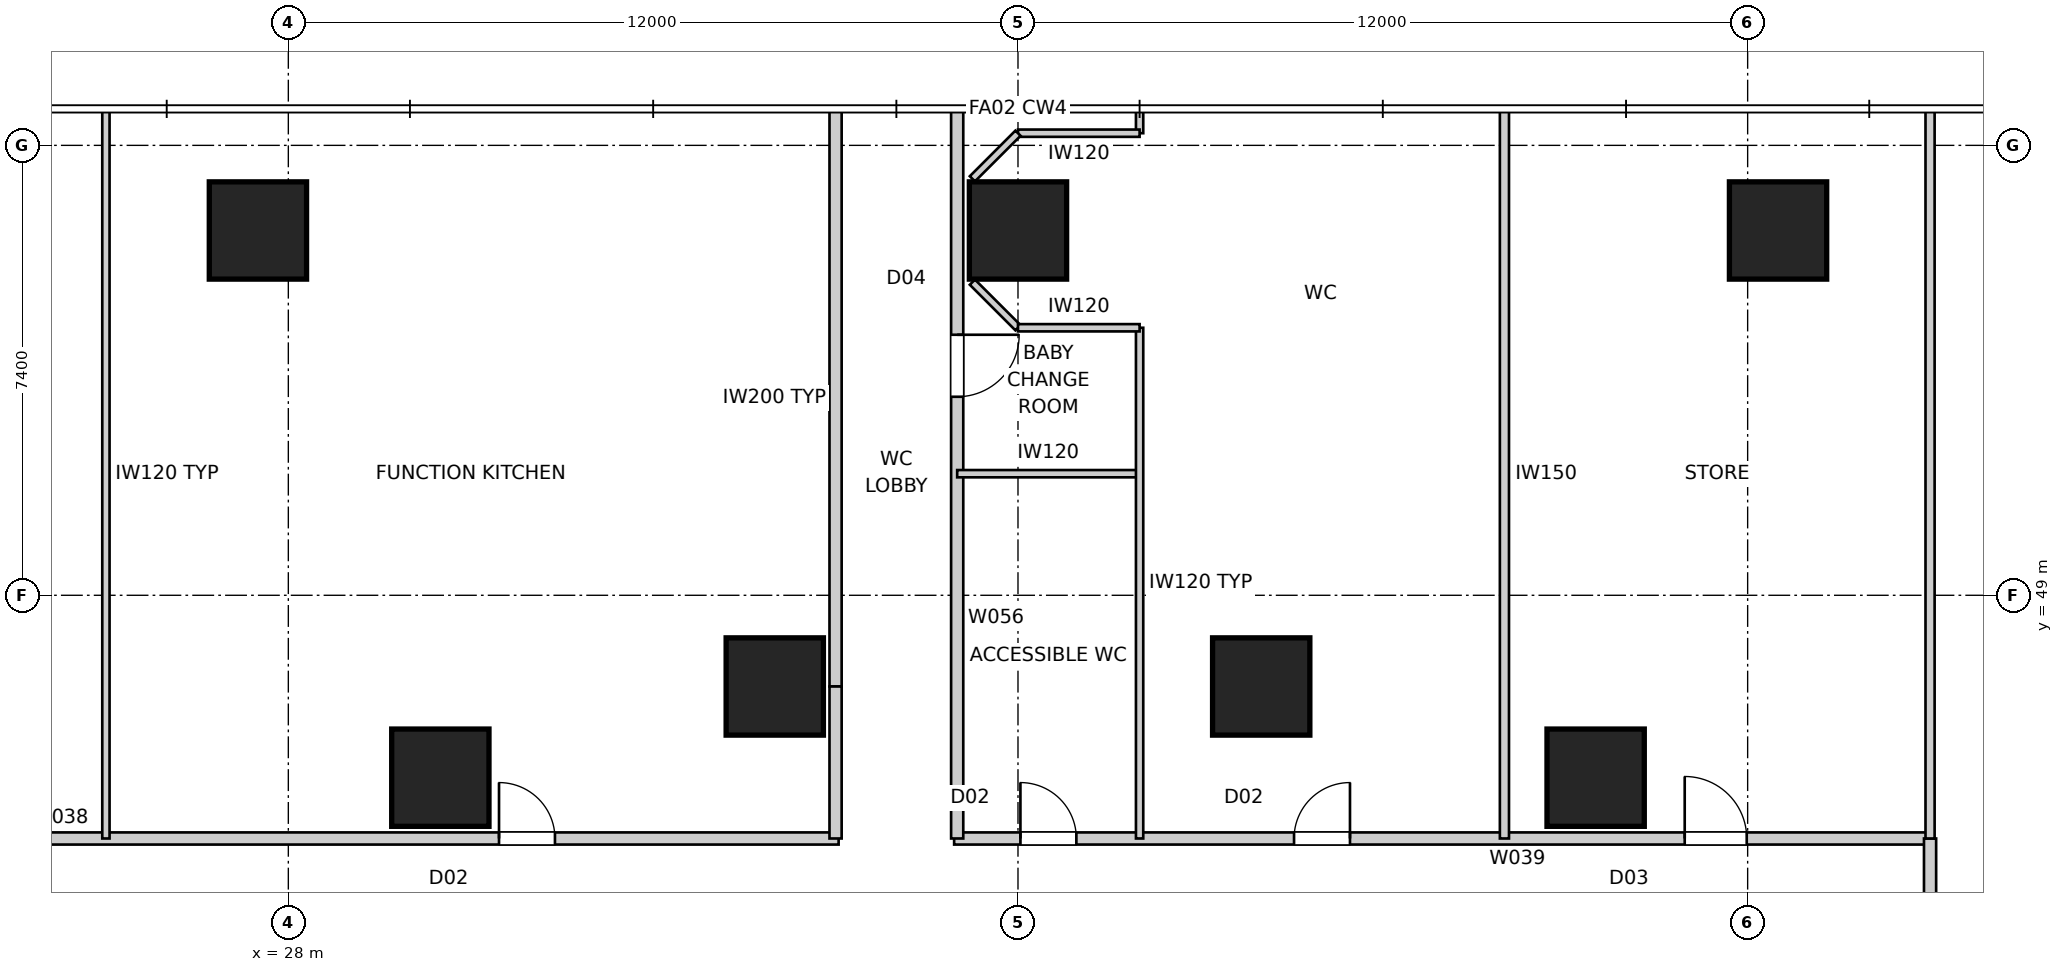
"""IFC4 building model, lengths in metres.
Left out: names, types, materials, properties, quantities, classifications, styles, units other than length and angle.
Written with IfcOpenShell. Run it as: python <this file> out.ifc"""

import sys

from ifc_helpers import new_model, si_unit, direction, frame, frame_2d, origin, origin_2d, place, context, subcontext, project, spatial, rectangle, extrude, element, fill, save


model = new_model("IFC4")
c1 = context("Model", 3, precision=1e-05, world=origin(), true_north=direction((0.0, 1.0)))
c2 = subcontext(c1, "Body", "Model", "MODEL_VIEW")
j1 = project(units=[si_unit("LENGTHUNIT", "METRE"), si_unit("PLANEANGLEUNIT", "RADIAN")], contexts=[c1])
p1 = place(None, origin())
s1 = spatial("IfcSite", under=j1, at=p1, CompositionType="ELEMENT")
p2 = place(p1, origin())
s2 = spatial("IfcBuilding", under=s1, at=p2, CompositionType="ELEMENT")
p3 = place(p2, frame((0.0, 0.0, 10.5)))
s3 = spatial("IfcBuildingStorey", under=s2, at=p3, CompositionType="ELEMENT", Elevation=10.5)
for number, where, z_axis, x_axis in (
    (1, (52.5, 55.0, 0.0), (0.0, 0.0, 1.0), (1.0, 0.0, 0.0)),
    (2, (40.0, 55.0, 0.0), (0.0, 0.0, 1.0), (1.0, 0.0, 0.0)),
    (3, (27.5, 55.0, 0.0), (0.0, 0.0, 1.0), (1.0, 0.0, 0.0)),
    (4, (49.5, 46.0, 0.0), (0.0, 0.0, 1.0), (1.0, 0.0, 0.0)),
    (5, (44.0, 47.5, 0.0), (0.0, 0.0, 1.0), (1.0, 0.0, 0.0)),
    (6, (36.0, 47.5, 0.0), (0.0, 0.0, 1.0), (1.0, 0.0, 0.0)),
    (7, (30.5, 46.0, 0.0), (0.0, 0.0, 1.0), (1.0, 0.0, 0.0)),
):
    element("IfcColumn", number, at=place(p3, frame(where, z_axis=z_axis, x_axis=x_axis)), inside=s3, PredefinedType="COLUMN", context=c2, shape_type="SweptSolid", body=[
        extrude(rectangle(XDim=1.6, YDim=1.6, at=origin_2d()), origin(), (0.0, 0.0, 1.0), 4.5),
    ])
p4 = place(p3, frame((8.4, 45.0, 0.0), z_axis=(0.0, 0.0, 1.0), x_axis=(1.0, 0.0, 0.0)))
e8 = element("IfcWall", 8, at=p4, inside=s3, PredefinedType="PARTITIONING", context=c2, shape_type="SweptSolid", body=[
    extrude(rectangle(XDim=28.65, YDim=0.2, at=frame_2d((14.325, 0.0))), origin(), (0.0, 0.0, 1.0), 4.35),
])
p5 = place(p4, frame((23.065, 0.0, 0.0)))
e9 = element("IfcOpeningElement", 9, at=p5, cuts=e8, PredefinedType="OPENING", context=c2, shape_type="SweptSolid", body=[
    extrude(rectangle(XDim=0.92, YDim=2.34, at=frame_2d((0.46, 1.17))), frame((0.0, 0.11, 0.0), z_axis=(0.0, -1.0, 0.0), x_axis=(1.0, 0.0, 0.0)), (0.0, 0.0, 1.0), 0.22),
])
p6 = place(p4, frame((7.715, 0.0, 0.0)))
e10 = element("IfcOpeningElement", 10, at=p6, cuts=e8, PredefinedType="OPENING", context=c2, shape_type="SweptSolid", body=[
    extrude(rectangle(XDim=0.92, YDim=2.34, at=frame_2d((0.46, 1.17))), frame((0.0, 0.11, 0.0), z_axis=(0.0, -1.0, 0.0), x_axis=(1.0, 0.0, 0.0)), (0.0, 0.0, 1.0), 0.22),
])
p7 = place(p3, frame((38.95, 45.0, 0.0), z_axis=(0.0, 0.0, 1.0), x_axis=(1.0, 0.0, 0.0)))
e11 = element("IfcWall", 11, at=p7, inside=s3, PredefinedType="PARTITIONING", context=c2, shape_type="SweptSolid", body=[
    extrude(rectangle(XDim=16.05, YDim=0.2, at=frame_2d((8.025, 0.0))), origin(), (0.0, 0.0, 1.0), 4.35),
])
p8 = place(p7, frame((12.015, 0.0, 0.0)))
e12 = element("IfcOpeningElement", 12, at=p8, cuts=e11, PredefinedType="OPENING", context=c2, shape_type="SweptSolid", body=[
    extrude(rectangle(XDim=1.02, YDim=2.1, at=frame_2d((0.51, 1.05))), frame((0.0, 0.11, 0.0), z_axis=(0.0, -1.0, 0.0), x_axis=(1.0, 0.0, 0.0)), (0.0, 0.0, 1.0), 0.22),
])
p9 = place(p7, frame((5.59, 0.0, 0.0)))
e13 = element("IfcOpeningElement", 13, at=p9, cuts=e11, PredefinedType="OPENING", context=c2, shape_type="SweptSolid", body=[
    extrude(rectangle(XDim=0.92, YDim=2.34, at=frame_2d((0.46, 1.17))), frame((0.0, 0.11, 0.0), z_axis=(0.0, -1.0, 0.0), x_axis=(1.0, 0.0, 0.0)), (0.0, 0.0, 1.0), 0.22),
])
p10 = place(p7, frame((1.09, 0.0, 0.0)))
e14 = element("IfcOpeningElement", 14, at=p10, cuts=e11, PredefinedType="OPENING", context=c2, shape_type="SweptSolid", body=[
    extrude(rectangle(XDim=0.92, YDim=2.34, at=frame_2d((0.46, 1.17))), frame((0.0, 0.11, 0.0), z_axis=(0.0, -1.0, 0.0), x_axis=(1.0, 0.0, 0.0)), (0.0, 0.0, 1.0), 0.22),
])
p11 = place(p3, frame((55.0, 45.0, 0.0), z_axis=(0.0, 0.0, 1.0), x_axis=(0.0, -1.0, 0.0)))
e15 = element("IfcWall", 15, at=p11, inside=s3, PredefinedType="PARTITIONING", context=c2, shape_type="SweptSolid", body=[
    extrude(rectangle(XDim=26.05, YDim=0.2, at=frame_2d((13.025, 0.0))), origin(), (0.0, 0.0, 1.0), 4.35),
])
p12 = place(p11, frame((7.015, 0.0, 0.0)))
e16 = element("IfcOpeningElement", 16, at=p12, cuts=e15, PredefinedType="OPENING", context=c2, shape_type="SweptSolid", body=[
    extrude(rectangle(XDim=1.02, YDim=2.1, at=frame_2d((0.51, 1.05))), frame((0.0, 0.11, 0.0), z_axis=(0.0, -1.0, 0.0), x_axis=(1.0, 0.0, 0.0)), (0.0, 0.0, 1.0), 0.22),
])
p13 = place(p11, frame((20.04, 0.0, 0.0)))
e17 = element("IfcOpeningElement", 17, at=p13, cuts=e15, PredefinedType="OPENING", context=c2, shape_type="SweptSolid", body=[
    extrude(rectangle(XDim=0.92, YDim=2.34, at=frame_2d((0.46, 1.17))), frame((0.0, 0.11, 0.0), z_axis=(0.0, -1.0, 0.0), x_axis=(1.0, 0.0, 0.0)), (0.0, 0.0, 1.0), 0.22),
])
p14 = place(p3, frame((25.0, 57.0, 0.0), z_axis=(0.0, 0.0, 1.0), x_axis=(0.0, -1.0, 0.0)))
e18 = element("IfcWall", 18, at=p14, inside=s3, PredefinedType="PARTITIONING", context=c2, shape_type="SweptSolid", body=[
    extrude(rectangle(XDim=12.0, YDim=0.12, at=frame_2d((6.0, 0.0))), origin(), (0.0, 0.0, 1.0), 4.35),
])
p15 = place(p3, frame((37.0, 57.0, 0.0), z_axis=(0.0, 0.0, 1.0), x_axis=(0.0, -1.0, 0.0)))
e19 = element("IfcWall", 19, at=p15, inside=s3, PredefinedType="PARTITIONING", context=c2, shape_type="SweptSolid", body=[
    extrude(rectangle(XDim=9.5, YDim=0.2, at=frame_2d((4.75, 0.0))), origin(), (0.0, 0.0, 1.0), 4.35),
])
p16 = place(p3, frame((37.0, 47.5, 0.0), z_axis=(0.0, 0.0, 1.0), x_axis=(0.0, -1.0, 0.0)))
e20 = element("IfcWall", 20, at=p16, inside=s3, PredefinedType="PARTITIONING", context=c2, shape_type="SweptSolid", body=[
    extrude(rectangle(XDim=2.5, YDim=0.2, at=frame_2d((1.25, 0.0))), origin(), (0.0, 0.0, 1.0), 3.895),
])
p17 = place(p3, frame((39.0, 57.0, 0.0), z_axis=(0.0, 0.0, 1.0), x_axis=(0.0, -1.0, 0.0)))
e21 = element("IfcWall", 21, at=p17, inside=s3, PredefinedType="PARTITIONING", context=c2, shape_type="SweptSolid", body=[
    extrude(rectangle(XDim=12.0, YDim=0.2, at=frame_2d((6.0, 0.0))), origin(), (0.0, 0.0, 1.0), 4.35),
])
p18 = place(p17, frame((3.715, 0.0, 0.0)))
e22 = element("IfcOpeningElement", 22, at=p18, cuts=e21, PredefinedType="OPENING", context=c2, shape_type="SweptSolid", body=[
    extrude(rectangle(XDim=1.02, YDim=2.4, at=frame_2d((0.51, 1.2))), frame((0.0, 0.11, 0.0), z_axis=(0.0, -1.0, 0.0), x_axis=(1.0, 0.0, 0.0)), (0.0, 0.0, 1.0), 0.22),
])
p19 = place(p3, frame((39.0, 51.0, 0.0), z_axis=(0.0, 0.0, 1.0), x_axis=(1.0, 0.0, 0.0)))
e23 = element("IfcWall", 23, at=p19, inside=s3, PredefinedType="PARTITIONING", context=c2, shape_type="SweptSolid", body=[
    extrude(rectangle(XDim=3.0, YDim=0.12, at=frame_2d((1.5, 0.0))), origin(), (0.0, 0.0, 1.0), 4.35),
])
p20 = place(p3, frame((42.0, 53.4, 0.0), z_axis=(0.0, 0.0, 1.0), x_axis=(0.0, -1.0, 0.0)))
e24 = element("IfcWall", 24, at=p20, inside=s3, PredefinedType="PARTITIONING", context=c2, shape_type="SweptSolid", body=[
    extrude(rectangle(XDim=8.4, YDim=0.12, at=frame_2d((4.2, 0.0))), origin(), (0.0, 0.0, 1.0), 3.822),
])
p21 = place(p3, frame((42.0, 57.0, 0.0), z_axis=(0.0, 0.0, 1.0), x_axis=(0.0, -1.0, 0.0)))
e25 = element("IfcWall", 25, at=p21, inside=s3, PredefinedType="PARTITIONING", context=c2, shape_type="SweptSolid", body=[
    extrude(rectangle(XDim=0.4, YDim=0.12, at=frame_2d((0.2, 0.0))), origin(), (0.0, 0.0, 1.0), 4.35),
])
p22 = place(p3, frame((42.0, 56.6, 0.0), z_axis=(0.0, 0.0, 1.0), x_axis=(-1.0, 0.0, 0.0)))
e26 = element("IfcWall", 26, at=p22, inside=s3, PredefinedType="PARTITIONING", context=c2, shape_type="SweptSolid", body=[
    extrude(rectangle(XDim=2.0, YDim=0.12, at=frame_2d((1.0, 0.0))), origin(), (0.0, 0.0, 1.0), 4.35),
])
for number, where, z_axis, x_axis in (
    (27, (40.0, 56.6, 0.0), (0.0, 0.0, 1.0), (-0.707, -0.707, 0.0)),
    (28, (39.25, 54.15, 0.0), (0.0, 0.0, 1.0), (0.707, -0.707, 0.0)),
):
    element("IfcWall", number, at=place(p3, frame(where, z_axis=z_axis, x_axis=x_axis)), inside=s3, PredefinedType="PARTITIONING", context=c2, shape_type="SweptSolid", body=[
        extrude(rectangle(XDim=1.061, YDim=0.12, at=frame_2d((0.53, 0.0))), origin(), (0.0, 0.0, 1.0), 4.35),
    ])
p23 = place(p3, frame((40.0, 53.4, 0.0), z_axis=(0.0, 0.0, 1.0), x_axis=(1.0, 0.0, 0.0)))
e29 = element("IfcWall", 29, at=p23, inside=s3, PredefinedType="PARTITIONING", context=c2, shape_type="SweptSolid", body=[
    extrude(rectangle(XDim=2.0, YDim=0.12, at=frame_2d((1.0, 0.0))), origin(), (0.0, 0.0, 1.0), 4.35),
])
for number, where, z_axis, x_axis in (
    (30, (48.0, 57.0, 0.0), (0.0, 0.0, 1.0), (0.0, -1.0, 0.0)),
    (31, (55.0, 57.0, 0.0), (0.0, 0.0, 1.0), (0.0, -1.0, 0.0)),
):
    element("IfcWall", number, at=place(p3, frame(where, z_axis=z_axis, x_axis=x_axis)), inside=s3, PredefinedType="SOLIDWALL", context=c2, shape_type="SweptSolid", body=[
        extrude(rectangle(XDim=12.0, YDim=0.15, at=frame_2d((6.0, 0.0))), origin(), (0.0, 0.0, 1.0), 4.35),
    ])
p24 = place(p5, origin())
e32 = element("IfcDoor", 32, at=p24, inside=s3, OperationType="SINGLE_SWING_LEFT", PredefinedType="DOOR", context=c2, shape_type="SweptSolid", body=[
    extrude(rectangle(XDim=0.92, YDim=2.34, at=frame_2d((0.46, 1.17))), frame((0.0, 0.025, 0.0), z_axis=(0.0, -1.0, 0.0), x_axis=(1.0, 0.0, 0.0)), (0.0, 0.0, 1.0), 0.05),
])
fill(e9, e32)
p25 = place(p8, origin())
e33 = element("IfcDoor", 33, at=p25, inside=s3, OperationType="SINGLE_SWING_LEFT", PredefinedType="DOOR", context=c2, shape_type="SweptSolid", body=[
    extrude(rectangle(XDim=1.02, YDim=2.1, at=frame_2d((0.51, 1.05))), frame((0.0, 0.025, 0.0), z_axis=(0.0, -1.0, 0.0), x_axis=(1.0, 0.0, 0.0)), (0.0, 0.0, 1.0), 0.05),
])
fill(e12, e33)
p26 = place(p9, origin())
e34 = element("IfcDoor", 34, at=p26, inside=s3, OperationType="SINGLE_SWING_RIGHT", PredefinedType="DOOR", context=c2, shape_type="SweptSolid", body=[
    extrude(rectangle(XDim=0.92, YDim=2.34, at=frame_2d((0.46, 1.17))), frame((0.0, 0.025, 0.0), z_axis=(0.0, -1.0, 0.0), x_axis=(1.0, 0.0, 0.0)), (0.0, 0.0, 1.0), 0.05),
])
fill(e13, e34)
p27 = place(p10, origin())
e35 = element("IfcDoor", 35, at=p27, inside=s3, OperationType="SINGLE_SWING_LEFT", PredefinedType="DOOR", context=c2, shape_type="SweptSolid", body=[
    extrude(rectangle(XDim=0.92, YDim=2.34, at=frame_2d((0.46, 1.17))), frame((0.0, 0.025, 0.0), z_axis=(0.0, -1.0, 0.0), x_axis=(1.0, 0.0, 0.0)), (0.0, 0.0, 1.0), 0.05),
])
fill(e14, e35)
p28 = place(p18, origin())
e36 = element("IfcDoor", 36, at=p28, inside=s3, OperationType="SINGLE_SWING_LEFT", PredefinedType="DOOR", context=c2, shape_type="SweptSolid", body=[
    extrude(rectangle(XDim=1.02, YDim=2.4, at=frame_2d((0.51, 1.2))), frame((0.0, 0.025, 0.0), z_axis=(0.0, -1.0, 0.0), x_axis=(1.0, 0.0, 0.0)), (0.0, 0.0, 1.0), 0.05),
])
fill(e22, e36)
save(model, sys.argv[1])
